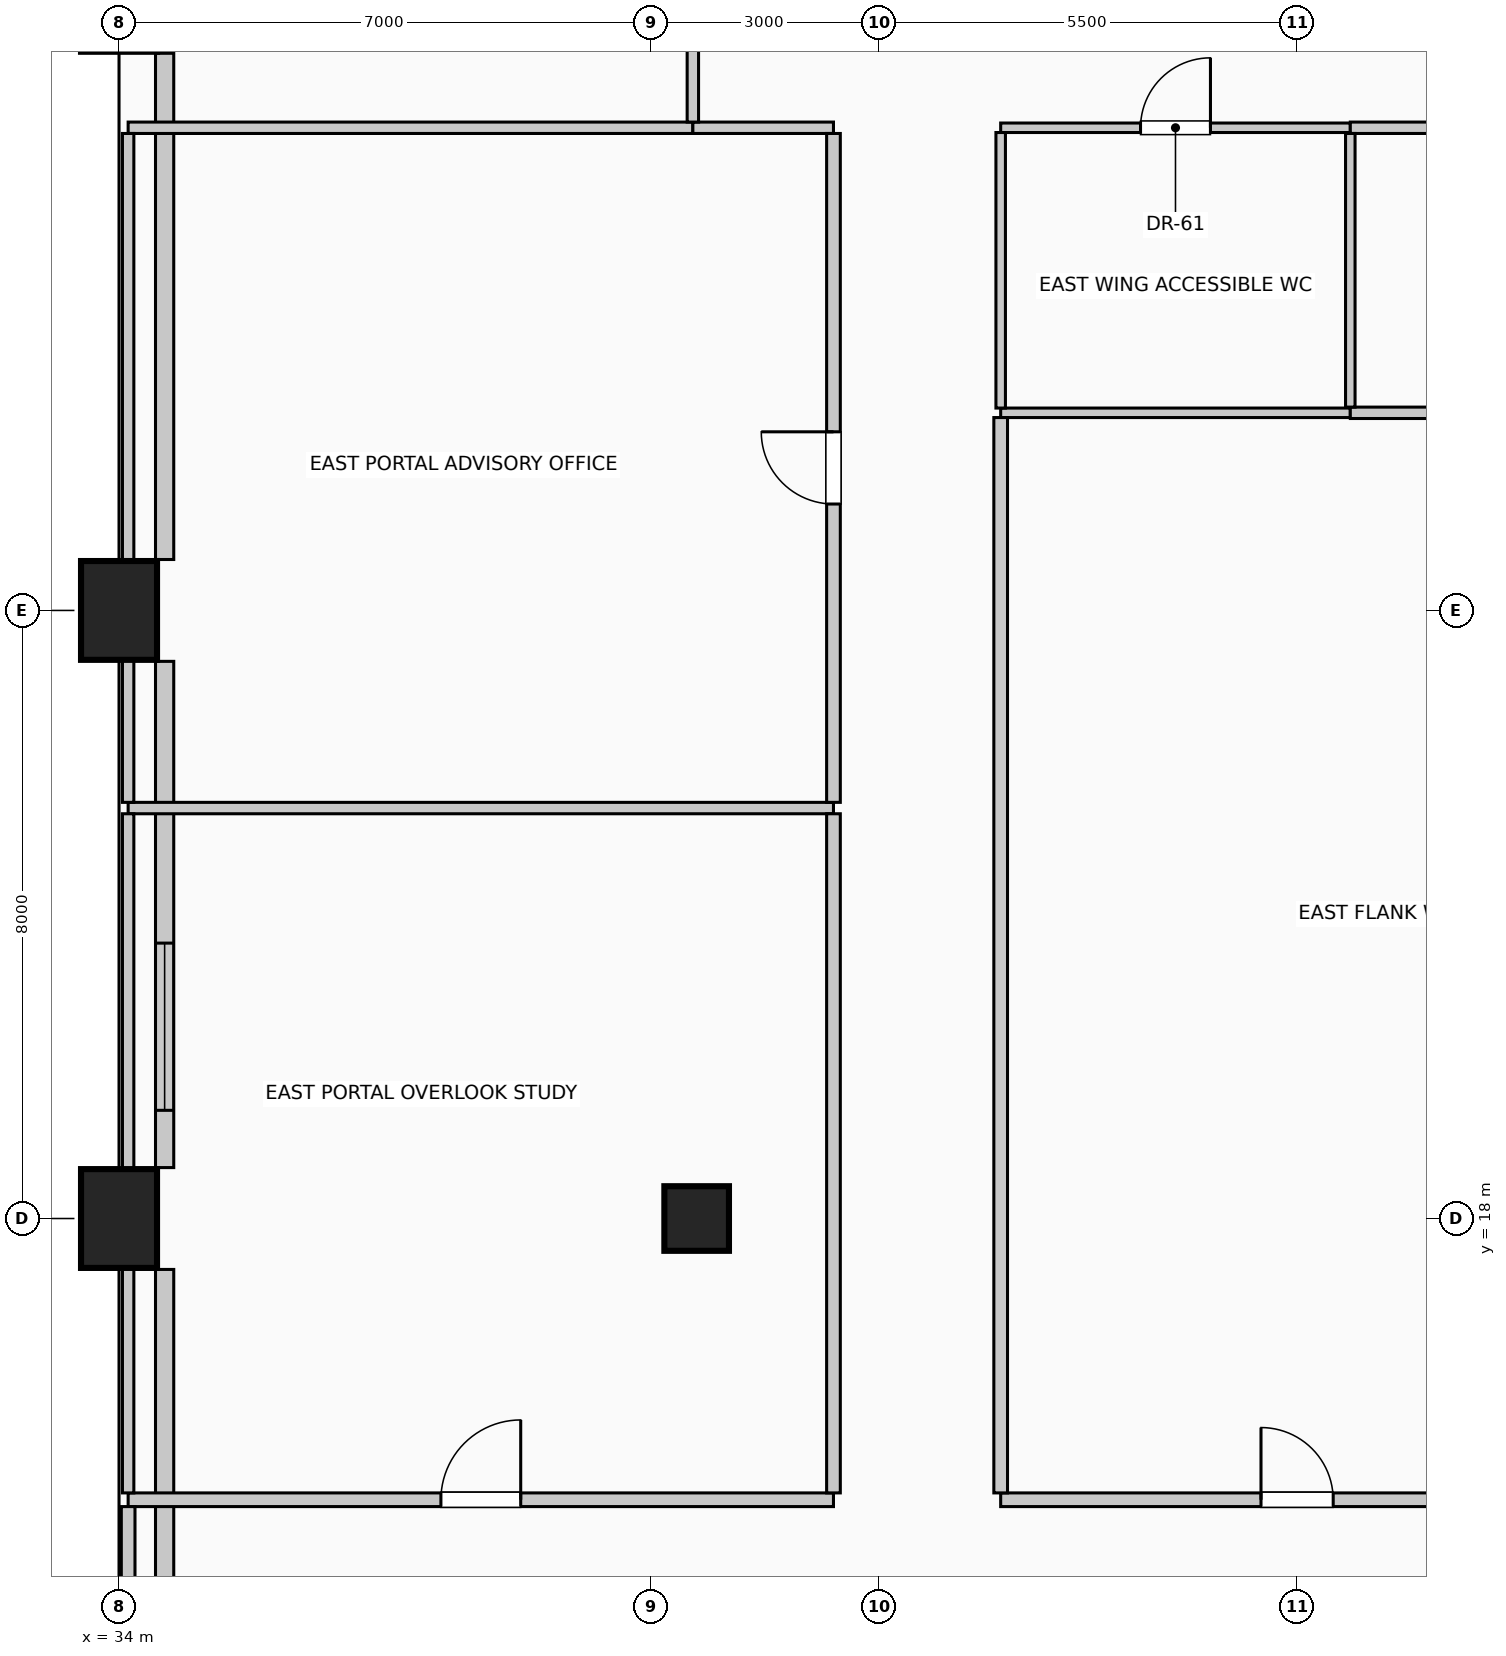
"""IFC4 building model, lengths in metres.
Left out: names, types, materials, properties, quantities, classifications, styles, units other than length and angle.
Written with IfcOpenShell. Run it as: python <this file> out.ifc"""

import sys

from ifc_helpers import new_model, si_unit, direction, frame, frame_2d, origin, origin_2d, place, context, subcontext, project, spatial, rectangle, circle, extrude, element, fill, save


model = new_model("IFC4")
c1 = context("Model", 3, precision=1e-05, world=origin(), true_north=direction((0.0, 1.0)))
c2 = subcontext(c1, "Body", "Model", "MODEL_VIEW")
j1 = project(units=[si_unit("LENGTHUNIT", "METRE"), si_unit("PLANEANGLEUNIT", "RADIAN")], contexts=[c1])
p1 = place(None, origin())
s1 = spatial("IfcSite", under=j1, at=p1, CompositionType="ELEMENT")
p2 = place(p1, origin())
s2 = spatial("IfcBuilding", under=s1, at=p2, CompositionType="ELEMENT")
p3 = place(p2, frame((0.0, 0.0, 194.6)))
s3 = spatial("IfcBuildingStorey", under=s2, at=p3, CompositionType="ELEMENT", Elevation=194.6)
for number, where, z_axis, x_axis in (
    (1, (34.0, 18.0, 0.0), (0.0, 0.0, 1.0), (1.0, 0.0, 0.0)),
    (2, (34.0, 26.0, 0.0), (0.0, 0.0, 1.0), (1.0, 0.0, 0.0)),
    (3, (34.0, 34.0, 0.0), (0.0, 0.0, 1.0), (1.0, 0.0, 0.0)),
):
    element("IfcColumn", number, at=place(p3, frame(where, z_axis=z_axis, x_axis=x_axis)), inside=s3, PredefinedType="COLUMN", context=c2, shape_type="SweptSolid", body=[
        extrude(rectangle(XDim=1.0, YDim=1.3, at=origin_2d()), origin(), (0.0, 0.0, 1.0), 4.0),
    ])
p4 = place(p3, frame((41.6, 18.0, 0.0), z_axis=(0.0, 0.0, 1.0), x_axis=(1.0, 0.0, 0.0)))
e4 = element("IfcColumn", 4, at=p4, inside=s3, PredefinedType="COLUMN", context=c2, shape_type="SweptSolid", body=[
    extrude(circle(Radius=0.425, at=origin_2d()), origin(), (0.0, 0.0, 1.0), 4.0),
])
p5 = place(p3, frame((34.6, 10.67, 0.0), z_axis=(0.0, 0.0, 1.0), x_axis=(0.0, 1.0, 0.0)))
e5 = element("IfcWall", 5, at=p5, inside=s3, PredefinedType="SOLIDWALL", context=c2, shape_type="SweptSolid", body=[
    extrude(rectangle(XDim=6.66, YDim=0.24, at=frame_2d((3.33, 0.0))), origin(), (0.0, 0.0, 1.0), 3.75),
])
p6 = place(p3, frame((34.6, 18.67, 0.0), z_axis=(0.0, 0.0, 1.0), x_axis=(0.0, 1.0, 0.0)))
e6 = element("IfcWall", 6, at=p6, inside=s3, PredefinedType="SOLIDWALL", context=c2, shape_type="SweptSolid", body=[
    extrude(rectangle(XDim=6.66, YDim=0.24, at=frame_2d((3.33, 0.0))), origin(), (0.0, 0.0, 1.0), 3.75),
])
p7 = place(p6, frame((0.753, 0.0, 0.42)))
e7 = element("IfcOpeningElement", 7, at=p7, cuts=e6, PredefinedType="OPENING", context=c2, shape_type="SweptSolid", body=[
    extrude(rectangle(XDim=2.2, YDim=1.95, at=frame_2d((1.1, 0.975))), frame((0.0, 0.13, 0.0), z_axis=(0.0, -1.0, 0.0), x_axis=(1.0, 0.0, 0.0)), (0.0, 0.0, 1.0), 0.26),
])
p8 = place(p3, frame((34.6, 26.67, 0.0), z_axis=(0.0, 0.0, 1.0), x_axis=(0.0, 1.0, 0.0)))
e8 = element("IfcWall", 8, at=p8, inside=s3, PredefinedType="SOLIDWALL", context=c2, shape_type="SweptSolid", body=[
    extrude(rectangle(XDim=6.66, YDim=0.24, at=frame_2d((3.33, 0.0))), origin(), (0.0, 0.0, 1.0), 3.75),
])
p9 = place(p3, frame((34.12, 14.3, 0.0), z_axis=(0.0, 0.0, 1.0), x_axis=(1.0, 0.0, 0.0)))
e9 = element("IfcWall", 9, at=p9, inside=s3, PredefinedType="PARTITIONING", context=c2, shape_type="SweptSolid", body=[
    extrude(rectangle(XDim=9.28, YDim=0.18, at=frame_2d((4.64, 0.0))), origin(), (0.0, 0.0, 1.0), 3.75),
])
p10 = place(p9, frame((4.115, 0.0, 0.0)))
e10 = element("IfcOpeningElement", 10, at=p10, cuts=e9, PredefinedType="OPENING", context=c2, shape_type="SweptSolid", body=[
    extrude(rectangle(XDim=1.05, YDim=2.15, at=frame_2d((0.525, 1.075))), frame((0.0, 0.1, 0.0), z_axis=(0.0, -1.0, 0.0), x_axis=(1.0, 0.0, 0.0)), (0.0, 0.0, 1.0), 0.2),
])
p11 = place(p3, frame((45.6, 14.3, 0.0), z_axis=(0.0, 0.0, 1.0), x_axis=(1.0, 0.0, 0.0)))
e11 = element("IfcWall", 11, at=p11, inside=s3, PredefinedType="PARTITIONING", context=c2, shape_type="SweptSolid", body=[
    extrude(rectangle(XDim=7.8, YDim=0.18, at=frame_2d((3.9, 0.0))), origin(), (0.0, 0.0, 1.0), 3.75),
])
p12 = place(p11, frame((3.425, 0.0, 0.0)))
e12 = element("IfcOpeningElement", 12, at=p12, cuts=e11, PredefinedType="OPENING", context=c2, shape_type="SweptSolid", body=[
    extrude(rectangle(XDim=0.95, YDim=2.15, at=frame_2d((0.475, 1.075))), frame((0.0, 0.1, 0.0), z_axis=(0.0, -1.0, 0.0), x_axis=(1.0, 0.0, 0.0)), (0.0, 0.0, 1.0), 0.2),
])
p13 = place(p3, frame((34.12, 23.4, 0.0), z_axis=(0.0, 0.0, 1.0), x_axis=(1.0, 0.0, 0.0)))
e13 = element("IfcWall", 13, at=p13, inside=s3, PredefinedType="PARTITIONING", context=c2, shape_type="SweptSolid", body=[
    extrude(rectangle(XDim=9.28, YDim=0.15, at=frame_2d((4.64, 0.0))), origin(), (0.0, 0.0, 1.0), 3.75),
])
p14 = place(p3, frame((45.6, 28.6, 0.0), z_axis=(0.0, 0.0, 1.0), x_axis=(1.0, 0.0, 0.0)))
e14 = element("IfcWall", 14, at=p14, inside=s3, PredefinedType="PARTITIONING", context=c2, shape_type="SweptSolid", body=[
    extrude(rectangle(XDim=4.6, YDim=0.125, at=frame_2d((2.3, 0.0))), origin(), (0.0, 0.0, 1.0), 3.75),
])
p15 = place(p3, frame((50.2, 28.6, 0.0), z_axis=(0.0, 0.0, 1.0), x_axis=(1.0, 0.0, 0.0)))
e15 = element("IfcWall", 15, at=p15, inside=s3, PredefinedType="PARTITIONING", context=c2, shape_type="SweptSolid", body=[
    extrude(rectangle(XDim=7.08, YDim=0.15, at=frame_2d((3.54, 0.0))), origin(), (0.0, 0.0, 1.0), 3.75),
])
p16 = place(p3, frame((34.12, 32.35, 0.0), z_axis=(0.0, 0.0, 1.0), x_axis=(1.0, 0.0, 0.0)))
e16 = element("IfcWall", 16, at=p16, inside=s3, PredefinedType="PARTITIONING", context=c2, shape_type="SweptSolid", body=[
    extrude(rectangle(XDim=7.43, YDim=0.15, at=frame_2d((3.715, 0.0))), origin(), (0.0, 0.0, 1.0), 3.75),
])
p17 = place(p3, frame((41.55, 32.35, 0.0), z_axis=(0.0, 0.0, 1.0), x_axis=(1.0, 0.0, 0.0)))
e17 = element("IfcWall", 17, at=p17, inside=s3, PredefinedType="PARTITIONING", context=c2, shape_type="SweptSolid", body=[
    extrude(rectangle(XDim=1.85, YDim=0.15, at=frame_2d((0.925, 0.0))), origin(), (0.0, 0.0, 1.0), 3.75),
])
p18 = place(p3, frame((45.6, 32.35, 0.0), z_axis=(0.0, 0.0, 1.0), x_axis=(1.0, 0.0, 0.0)))
e18 = element("IfcWall", 18, at=p18, inside=s3, PredefinedType="PARTITIONING", context=c2, shape_type="SweptSolid", body=[
    extrude(rectangle(XDim=4.6, YDim=0.125, at=frame_2d((2.3, 0.0))), origin(), (0.0, 0.0, 1.0), 3.75),
])
p19 = place(p18, frame((1.84, 0.0, 0.0)))
e19 = element("IfcOpeningElement", 19, at=p19, cuts=e18, PredefinedType="OPENING", context=c2, shape_type="SweptSolid", body=[
    extrude(rectangle(XDim=0.92, YDim=2.1, at=frame_2d((0.46, 1.05))), frame((0.0, 0.073, 0.0), z_axis=(0.0, -1.0, 0.0), x_axis=(1.0, 0.0, 0.0)), (0.0, 0.0, 1.0), 0.145),
])
p20 = place(p3, frame((50.2, 32.35, 0.0), z_axis=(0.0, 0.0, 1.0), x_axis=(1.0, 0.0, 0.0)))
e20 = element("IfcWall", 20, at=p20, inside=s3, PredefinedType="PARTITIONING", context=c2, shape_type="SweptSolid", body=[
    extrude(rectangle(XDim=4.25, YDim=0.15, at=frame_2d((2.125, 0.0))), origin(), (0.0, 0.0, 1.0), 3.75),
])
p21 = place(p20, frame((1.6, 0.0, 0.0)))
e21 = element("IfcOpeningElement", 21, at=p21, cuts=e20, PredefinedType="OPENING", context=c2, shape_type="SweptSolid", body=[
    extrude(rectangle(XDim=1.05, YDim=2.15, at=frame_2d((0.525, 1.075))), frame((0.0, 0.085, 0.0), z_axis=(0.0, -1.0, 0.0), x_axis=(1.0, 0.0, 0.0)), (0.0, 0.0, 1.0), 0.17),
])
p22 = place(p3, frame((34.12, 12.29, 0.0), z_axis=(0.0, 0.0, 1.0), x_axis=(0.0, 1.0, 0.0)))
e22 = element("IfcWall", 22, at=p22, inside=s3, PredefinedType="PARTITIONING", context=c2, shape_type="SweptSolid", body=[
    extrude(rectangle(XDim=1.92, YDim=0.18, at=frame_2d((0.96, 0.0))), origin(), (0.0, 0.0, 1.0), 3.145),
])
p23 = place(p3, frame((34.12, 14.39, 0.0), z_axis=(0.0, 0.0, 1.0), x_axis=(0.0, 1.0, 0.0)))
e23 = element("IfcWall", 23, at=p23, inside=s3, PredefinedType="PARTITIONING", context=c2, shape_type="SweptSolid", body=[
    extrude(rectangle(XDim=2.96, YDim=0.15, at=frame_2d((1.48, 0.0))), origin(), (0.0, 0.0, 1.0), 3.145),
])
p24 = place(p3, frame((34.12, 18.65, 0.0), z_axis=(0.0, 0.0, 1.0), x_axis=(0.0, 1.0, 0.0)))
e24 = element("IfcWall", 24, at=p24, inside=s3, PredefinedType="PARTITIONING", context=c2, shape_type="SweptSolid", body=[
    extrude(rectangle(XDim=4.675, YDim=0.15, at=frame_2d((2.337, 0.0))), origin(), (0.0, 0.0, 1.0), 3.145),
])
p25 = place(p3, frame((34.12, 23.475, 0.0), z_axis=(0.0, 0.0, 1.0), x_axis=(0.0, 1.0, 0.0)))
e25 = element("IfcWall", 25, at=p25, inside=s3, PredefinedType="PARTITIONING", context=c2, shape_type="SweptSolid", body=[
    extrude(rectangle(XDim=1.875, YDim=0.15, at=frame_2d((0.938, 0.0))), origin(), (0.0, 0.0, 1.0), 3.145),
])
p26 = place(p3, frame((34.12, 26.65, 0.0), z_axis=(0.0, 0.0, 1.0), x_axis=(0.0, 1.0, 0.0)))
e26 = element("IfcWall", 26, at=p26, inside=s3, PredefinedType="PARTITIONING", context=c2, shape_type="SweptSolid", body=[
    extrude(rectangle(XDim=5.625, YDim=0.15, at=frame_2d((2.812, 0.0))), origin(), (0.0, 0.0, 1.0), 3.145),
])
p27 = place(p3, frame((41.55, 32.425, 0.0), z_axis=(0.0, 0.0, 1.0), x_axis=(0.0, 1.0, 0.0)))
e27 = element("IfcWall", 27, at=p27, inside=s3, PredefinedType="PARTITIONING", context=c2, shape_type="SweptSolid", body=[
    extrude(rectangle(XDim=1.15, YDim=0.15, at=frame_2d((0.575, 0.0))), origin(), (0.0, 0.0, 1.0), 3.145),
])
p28 = place(p3, frame((43.4, 14.39, 0.0), z_axis=(0.0, 0.0, 1.0), x_axis=(0.0, 1.0, 0.0)))
e28 = element("IfcWall", 28, at=p28, inside=s3, PredefinedType="PARTITIONING", context=c2, shape_type="SweptSolid", body=[
    extrude(rectangle(XDim=8.935, YDim=0.18, at=frame_2d((4.468, 0.0))), origin(), (0.0, 0.0, 1.0), 3.75),
])
p29 = place(p3, frame((43.4, 23.475, 0.0), z_axis=(0.0, 0.0, 1.0), x_axis=(0.0, 1.0, 0.0)))
e29 = element("IfcWall", 29, at=p29, inside=s3, PredefinedType="PARTITIONING", context=c2, shape_type="SweptSolid", body=[
    extrude(rectangle(XDim=8.8, YDim=0.18, at=frame_2d((4.4, 0.0))), origin(), (0.0, 0.0, 1.0), 3.75),
])
p30 = place(p29, frame((3.925, 0.0, 0.0)))
e30 = element("IfcOpeningElement", 30, at=p30, cuts=e29, PredefinedType="OPENING", context=c2, shape_type="SweptSolid", body=[
    extrude(rectangle(XDim=0.95, YDim=2.15, at=frame_2d((0.475, 1.075))), frame((0.0, 0.1, 0.0), z_axis=(0.0, -1.0, 0.0), x_axis=(1.0, 0.0, 0.0)), (0.0, 0.0, 1.0), 0.2),
])
p31 = place(p3, frame((45.6, 14.39, 0.0), z_axis=(0.0, 0.0, 1.0), x_axis=(0.0, 1.0, 0.0)))
e31 = element("IfcWall", 31, at=p31, inside=s3, PredefinedType="PARTITIONING", context=c2, shape_type="SweptSolid", body=[
    extrude(rectangle(XDim=14.148, YDim=0.18, at=frame_2d((7.074, 0.0))), origin(), (0.0, 0.0, 1.0), 3.75),
])
p32 = place(p3, frame((45.6, 28.663, 0.0), z_axis=(0.0, 0.0, 1.0), x_axis=(0.0, 1.0, 0.0)))
e32 = element("IfcWall", 32, at=p32, inside=s3, PredefinedType="PARTITIONING", context=c2, shape_type="SweptSolid", body=[
    extrude(rectangle(XDim=3.625, YDim=0.125, at=frame_2d((1.812, 0.0))), origin(), (0.0, 0.0, 1.0), 3.75),
])
p33 = place(p3, frame((50.2, 28.675, 0.0), z_axis=(0.0, 0.0, 1.0), x_axis=(0.0, 1.0, 0.0)))
e33 = element("IfcWall", 33, at=p33, inside=s3, PredefinedType="PARTITIONING", context=c2, shape_type="SweptSolid", body=[
    extrude(rectangle(XDim=3.6, YDim=0.125, at=frame_2d((1.8, 0.0))), origin(), (0.0, 0.0, 1.0), 3.75),
])
p34 = place(p7, origin())
e34 = element("IfcWindow", 34, at=p34, inside=s3, PartitioningType="SINGLE_PANEL", PredefinedType="WINDOW", context=c2, shape_type="SweptSolid", body=[
    extrude(rectangle(XDim=2.2, YDim=1.95, at=frame_2d((1.1, 0.975))), frame((0.0, 0.03, 0.0), z_axis=(0.0, -1.0, 0.0), x_axis=(1.0, 0.0, 0.0)), (0.0, 0.0, 1.0), 0.06),
])
fill(e7, e34)
p35 = place(p10, origin())
e35 = element("IfcDoor", 35, at=p35, inside=s3, OperationType="SINGLE_SWING_RIGHT", PredefinedType="DOOR", context=c2, shape_type="SweptSolid", body=[
    extrude(rectangle(XDim=1.05, YDim=2.15, at=frame_2d((0.525, 1.075))), frame((0.0, 0.025, 0.0), z_axis=(0.0, -1.0, 0.0), x_axis=(1.0, 0.0, 0.0)), (0.0, 0.0, 1.0), 0.05),
])
fill(e10, e35)
p36 = place(p12, origin())
e36 = element("IfcDoor", 36, at=p36, inside=s3, OperationType="SINGLE_SWING_LEFT", PredefinedType="DOOR", context=c2, shape_type="SweptSolid", body=[
    extrude(rectangle(XDim=0.95, YDim=2.15, at=frame_2d((0.475, 1.075))), frame((0.0, 0.025, 0.0), z_axis=(0.0, -1.0, 0.0), x_axis=(1.0, 0.0, 0.0)), (0.0, 0.0, 1.0), 0.05),
])
fill(e12, e36)
p37 = place(p19, origin())
e37 = element("IfcDoor", 37, at=p37, inside=s3, OperationType="SINGLE_SWING_RIGHT", PredefinedType="DOOR", context=c2, shape_type="SweptSolid", body=[
    extrude(rectangle(XDim=0.92, YDim=2.1, at=frame_2d((0.46, 1.05))), frame((0.0, 0.025, 0.0), z_axis=(0.0, -1.0, 0.0), x_axis=(1.0, 0.0, 0.0)), (0.0, 0.0, 1.0), 0.05),
])
fill(e19, e37)
p38 = place(p30, origin())
e38 = element("IfcDoor", 38, at=p38, inside=s3, OperationType="SINGLE_SWING_RIGHT", PredefinedType="DOOR", context=c2, shape_type="SweptSolid", body=[
    extrude(rectangle(XDim=0.95, YDim=2.15, at=frame_2d((0.475, 1.075))), frame((0.0, 0.025, 0.0), z_axis=(0.0, -1.0, 0.0), x_axis=(1.0, 0.0, 0.0)), (0.0, 0.0, 1.0), 0.05),
])
fill(e30, e38)
save(model, sys.argv[1])
